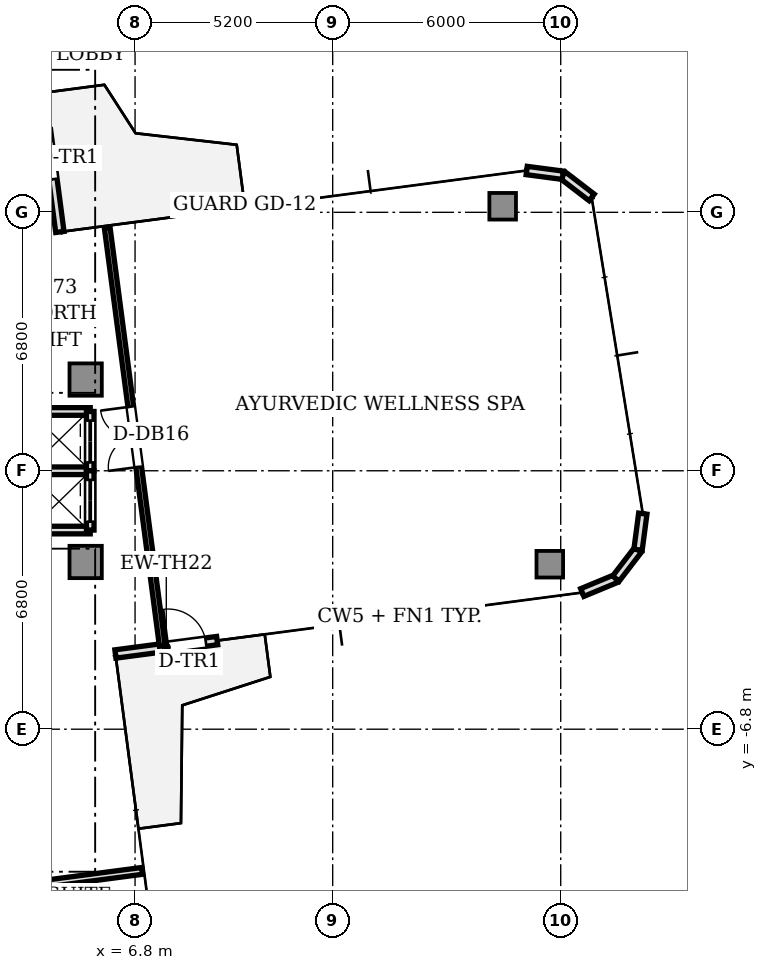
"""IFC4 building model, lengths in metres.
Left out: names, types, materials, properties, quantities, classifications, styles, units other than length and angle.
Written with IfcOpenShell. Run it as: python <this file> out.ifc"""

import sys

from ifc_helpers import new_model, si_unit, direction, frame, frame_2d, origin, origin_2d, place, context, subcontext, project, spatial, rectangle, extrude, source, transform, mapped, element, fill, save


model = new_model("IFC4")
c1 = context("Model", 3, precision=1e-05, world=origin(), true_north=direction((0.0, 1.0)))
c2 = subcontext(c1, "Body", "Model", "MODEL_VIEW")
j1 = project(units=[si_unit("LENGTHUNIT", "METRE"), si_unit("PLANEANGLEUNIT", "RADIAN")], contexts=[c1])
p1 = place(None, origin())
s1 = spatial("IfcSite", under=j1, at=p1, CompositionType="ELEMENT")
p2 = place(p1, origin())
s2 = spatial("IfcBuilding", under=s1, at=p2, CompositionType="ELEMENT")
p3 = place(p2, frame((0.0, 0.0, 261.25)))
s3 = spatial("IfcBuildingStorey", under=s2, at=p3, CompositionType="ELEMENT", Elevation=261.25)
m1 = source(origin(), c2, "Body", "SweptSolid", [
    extrude(rectangle(XDim=0.85, YDim=0.85, at=origin_2d()), origin(), (0.0, 0.0, 1.0), 3.03),
])
for number, where, z_axis, x_axis in (
    (1, (5.5, 2.4, 0.0), (0.0, 0.0, 1.0), (1.0, 0.0, 0.0)),
    (2, (5.5, -2.4, 0.0), (0.0, 0.0, 1.0), (1.0, 0.0, 0.0)),
):
    element("IfcColumn", number, at=place(p3, frame(where, z_axis=z_axis, x_axis=x_axis)), inside=s3, PredefinedType="COLUMN", context=c2, shape_type="MappedRepresentation", body=[
        mapped(m1, transform((0.0, 0.0, 0.0), scale=1.0)),
    ])
m2 = source(origin(), c2, "Body", "SweptSolid", [
    extrude(rectangle(XDim=0.7, YDim=0.7, at=origin_2d()), origin(), (0.0, 0.0, 1.0), 3.03),
])
for number, where, z_axis, x_axis in (
    (3, (17.712, -2.459, 0.0), (0.0, 0.0, 1.0), (1.0, 0.0, 0.0)),
    (4, (16.472, 6.96, 0.0), (0.0, 0.0, 1.0), (1.0, 0.0, 0.0)),
):
    element("IfcColumn", number, at=place(p3, frame(where, z_axis=z_axis, x_axis=x_axis)), inside=s3, PredefinedType="COLUMN", context=c2, shape_type="MappedRepresentation", body=[
        mapped(m2, transform((0.0, 0.0, 0.0), scale=1.0)),
    ])
p4 = place(p3, frame((6.283, -4.821, 0.0), z_axis=(0.0, 0.0, 1.0), x_axis=(0.991451525486, 0.130475563272, 0.0)))
e5 = element("IfcWall", 5, at=p4, inside=s3, PredefinedType="STANDARD", context=c2, shape_type="SweptSolid", body=[
    extrude(rectangle(XDim=2.7, YDim=0.22, at=frame_2d((1.35, 0.0))), origin(), (0.0, 0.0, 1.0), 3.03),
])
p5 = place(p4, frame((1.4, 0.0, 0.0)))
e6 = element("IfcOpeningElement", 6, at=p5, cuts=e5, PredefinedType="OPENING", context=c2, shape_type="SweptSolid", body=[
    extrude(rectangle(XDim=1.0, YDim=2.2, at=frame_2d((0.5, 1.1))), frame((0.0, 0.12, 0.0), z_axis=(0.0, -1.0, 0.0), x_axis=(1.0, 0.0, 0.0)), (0.0, 0.0, 1.0), 0.24),
])
p6 = place(p3, frame((18.567, -3.204, 0.0), z_axis=(0.0, 0.0, 1.0), x_axis=(0.923926759112, 0.382569397359, 0.0)))
e7 = element("IfcWall", 7, at=p6, inside=s3, PredefinedType="STANDARD", context=c2, shape_type="SweptSolid", body=[
    extrude(rectangle(XDim=0.958, YDim=0.22, at=frame_2d((0.479, 0.0))), origin(), (0.0, 0.0, 1.0), 3.03),
])
for number, where, z_axis, x_axis in (
    (8, (19.452, -2.837, 0.0), (0.0, 0.0, 1.0), (0.609, 0.793, 0.0)),
    (9, (20.035, -2.078, 0.0), (0.0, 0.0, 1.0), (0.131, 0.991, 0.0)),
    (10, (18.814, 7.192, 0.0), (0.0, 0.0, 1.0), (-0.793, 0.609, 0.0)),
):
    element("IfcWall", number, at=place(p3, frame(where, z_axis=z_axis, x_axis=x_axis)), inside=s3, PredefinedType="STANDARD", context=c2, shape_type="SweptSolid", body=[
        extrude(rectangle(XDim=0.958, YDim=0.22, at=frame_2d((0.479, 0.0))), origin(), (0.0, 0.0, 1.0), 3.03),
    ])
p7 = place(p3, frame((18.055, 7.775, 0.0), z_axis=(0.0, 0.0, 1.0), x_axis=(-0.991449089759, 0.130494070426, 0.0)))
e11 = element("IfcWall", 11, at=p7, inside=s3, PredefinedType="STANDARD", context=c2, shape_type="SweptSolid", body=[
    extrude(rectangle(XDim=0.958, YDim=0.22, at=frame_2d((0.479, 0.0))), origin(), (0.0, 0.0, 1.0), 3.03),
])
p8 = place(p3, frame((4.821, 6.283, 0.0), z_axis=(0.0, 0.0, 1.0), x_axis=(-0.130475563272, 0.991451525486, 0.0)))
e12 = element("IfcWall", 12, at=p8, inside=s3, PredefinedType="STANDARD", context=c2, shape_type="SweptSolid", body=[
    extrude(rectangle(XDim=2.7, YDim=0.22, at=frame_2d((1.35, 0.0))), origin(), (0.0, 0.0, 1.0), 3.03),
])
p9 = place(p8, frame((1.4, 0.0, 0.0)))
e13 = element("IfcOpeningElement", 13, at=p9, cuts=e12, PredefinedType="OPENING", context=c2, shape_type="SweptSolid", body=[
    extrude(rectangle(XDim=1.0, YDim=2.2, at=frame_2d((0.5, 1.1))), frame((0.0, 0.12, 0.0), z_axis=(0.0, -1.0, 0.0), x_axis=(1.0, 0.0, 0.0)), (0.0, 0.0, 1.0), 0.24),
])
for number, where, z_axis, x_axis in (
    (14, (3.98, 1.56, 0.0), (0.0, 0.0, 1.0), (1.0, 0.0, 0.0)),
    (15, (3.98, -1.56, 0.0), (0.0, 0.0, 1.0), (1.0, 0.0, 0.0)),
    (16, (3.98, 0.0, 0.0), (0.0, 0.0, 1.0), (1.0, 0.0, 0.0)),
):
    element("IfcWall", number, at=place(p3, frame(where, z_axis=z_axis, x_axis=x_axis)), inside=s3, PredefinedType="SOLIDWALL", context=c2, shape_type="SweptSolid", body=[
        extrude(rectangle(XDim=1.64, YDim=0.2, at=frame_2d((0.82, 0.0))), origin(), (0.0, 0.0, 1.0), 2.58),
    ])
p10 = place(p3, frame((5.62, 0.0, 0.0), z_axis=(0.0, 0.0, 1.0), x_axis=(0.0, 1.0, 0.0)))
e17 = element("IfcWall", 17, at=p10, inside=s3, PredefinedType="SOLIDWALL", context=c2, shape_type="SweptSolid", body=[
    extrude(rectangle(XDim=1.56, YDim=0.2, at=frame_2d((0.78, 0.0))), origin(), (0.0, 0.0, 1.0), 2.58),
])
p11 = place(p10, frame((0.22, 0.0, 0.0)))
e18 = element("IfcOpeningElement", 18, at=p11, cuts=e17, PredefinedType="OPENING", context=c2, shape_type="SweptSolid", body=[
    extrude(rectangle(XDim=1.1, YDim=2.2, at=frame_2d((0.55, 1.1))), frame((0.0, 0.11, 0.0), z_axis=(0.0, -1.0, 0.0), x_axis=(1.0, 0.0, 0.0)), (0.0, 0.0, 1.0), 0.22),
])
p12 = place(p3, frame((5.62, -1.56, 0.0), z_axis=(0.0, 0.0, 1.0), x_axis=(0.0, 1.0, 0.0)))
e19 = element("IfcWall", 19, at=p12, inside=s3, PredefinedType="SOLIDWALL", context=c2, shape_type="SweptSolid", body=[
    extrude(rectangle(XDim=1.56, YDim=0.2, at=frame_2d((0.78, 0.0))), origin(), (0.0, 0.0, 1.0), 2.58),
])
p13 = place(p12, frame((0.22, 0.0, 0.0)))
e20 = element("IfcOpeningElement", 20, at=p13, cuts=e19, PredefinedType="OPENING", context=c2, shape_type="SweptSolid", body=[
    extrude(rectangle(XDim=1.1, YDim=2.2, at=frame_2d((0.55, 1.1))), frame((0.0, 0.11, 0.0), z_axis=(0.0, -1.0, 0.0), x_axis=(1.0, 0.0, 0.0)), (0.0, 0.0, 1.0), 0.22),
])
p14 = place(p3, frame((7.516, -4.608, 0.0), z_axis=(0.0, 0.0, 1.0), x_axis=(-0.130539856574, 0.991443062332, 0.0)))
e21 = element("IfcWall", 21, at=p14, inside=s3, PredefinedType="PARTITIONING", context=c2, shape_type="SweptSolid", body=[
    extrude(rectangle(XDim=11.1, YDim=0.15, at=frame_2d((5.55, 0.0))), origin(), (0.0, 0.0, 1.0), 2.58),
])
p15 = place(p14, frame((4.75, 0.0, 0.0)))
e22 = element("IfcOpeningElement", 22, at=p15, cuts=e21, PredefinedType="OPENING", context=c2, shape_type="SweptSolid", body=[
    extrude(rectangle(XDim=1.6, YDim=2.25, at=frame_2d((0.8, 1.125))), frame((0.0, 0.085, 0.0), z_axis=(0.0, -1.0, 0.0), x_axis=(1.0, 0.0, 0.0)), (0.0, 0.0, 1.0), 0.17),
])
p16 = place(p3, frame((2.423, -11.129, 0.0), z_axis=(0.0, 0.0, 1.0), x_axis=(0.991446706518, 0.130512176195, 0.0)))
e23 = element("IfcWall", 23, at=p16, inside=s3, PredefinedType="PARTITIONING", context=c2, shape_type="SweptSolid", body=[
    extrude(rectangle(XDim=4.6, YDim=0.18, at=frame_2d((2.3, 0.0))), origin(), (0.0, 0.0, 1.0), 2.58),
])
m3 = source(origin(), c2, "Body", "SweptSolid", [
    extrude(rectangle(XDim=1.0, YDim=0.05, at=origin_2d()), origin(), (0.0, 0.0, 1.0), 2.2),
])
p17 = place(p5, frame((0.5, 0.0, 0.0)))
e24 = element("IfcDoor", 24, at=p17, inside=s3, OperationType="SINGLE_SWING_LEFT", PredefinedType="DOOR", context=c2, shape_type="MappedRepresentation", body=[
    mapped(m3, transform((0.0, 0.0, 0.0), scale=1.0)),
])
fill(e6, e24)
p18 = place(p9, frame((0.5, 0.0, 0.0)))
e25 = element("IfcDoor", 25, at=p18, inside=s3, OperationType="SINGLE_SWING_LEFT", PredefinedType="DOOR", context=c2, shape_type="MappedRepresentation", body=[
    mapped(m3, transform((0.0, 0.0, 0.0), scale=1.0)),
])
fill(e13, e25)
m4 = source(origin(), c2, "Body", "SweptSolid", [
    extrude(rectangle(XDim=1.1, YDim=0.05, at=origin_2d()), origin(), (0.0, 0.0, 1.0), 2.2),
])
p19 = place(p11, frame((0.55, 0.0, 0.0)))
e26 = element("IfcDoor", 26, at=p19, inside=s3, OperationType="DOUBLE_DOOR_SLIDING", PredefinedType="DOOR", context=c2, shape_type="MappedRepresentation", body=[
    mapped(m4, transform((0.0, 0.0, 0.0), scale=1.0)),
])
fill(e18, e26)
p20 = place(p13, frame((0.55, 0.0, 0.0)))
e27 = element("IfcDoor", 27, at=p20, inside=s3, OperationType="DOUBLE_DOOR_SLIDING", PredefinedType="DOOR", context=c2, shape_type="MappedRepresentation", body=[
    mapped(m4, transform((0.0, 0.0, 0.0), scale=1.0)),
])
fill(e20, e27)
m5 = source(origin(), c2, "Body", "SweptSolid", [
    extrude(rectangle(XDim=1.6, YDim=0.05, at=origin_2d()), origin(), (0.0, 0.0, 1.0), 2.25),
])
p21 = place(p15, frame((0.8, 0.0, 0.0)))
e28 = element("IfcDoor", 28, at=p21, inside=s3, OperationType="DOUBLE_DOOR_SINGLE_SWING", PredefinedType="DOOR", context=c2, shape_type="MappedRepresentation", body=[
    mapped(m5, transform((0.0, 0.0, 0.0), scale=1.0)),
])
fill(e22, e28)
save(model, sys.argv[1])
